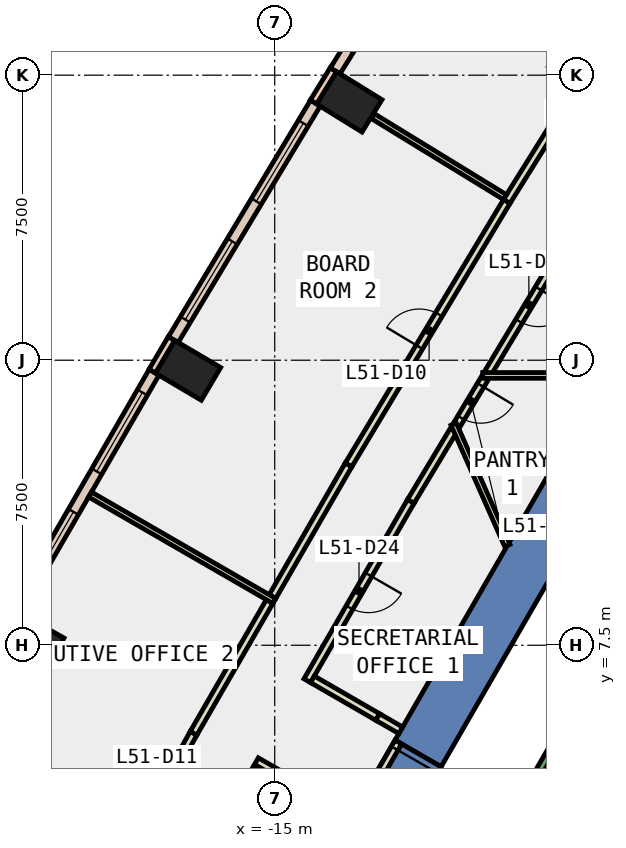
"""IFC4 building model, lengths in metres.
Left out: names, types, materials, properties, quantities, classifications, styles, units other than length and angle.
Written with IfcOpenShell. Run it as: python <this file> out.ifc"""

import sys

from ifc_helpers import new_model, si_unit, direction, frame, frame_2d, origin, origin_2d, place, context, subcontext, project, spatial, polyline, rectangle, outline, extrude, element, fill, save


model = new_model("IFC4")
c1 = context("Model", 3, precision=1e-05, world=origin(), true_north=direction((0.0, 1.0)))
c2 = subcontext(c1, "Body", "Model", "MODEL_VIEW")
j1 = project(units=[si_unit("LENGTHUNIT", "METRE"), si_unit("PLANEANGLEUNIT", "RADIAN")], contexts=[c1])
p1 = place(None, origin())
s1 = spatial("IfcSite", under=j1, at=p1, CompositionType="ELEMENT")
p2 = place(p1, origin())
s2 = spatial("IfcBuilding", under=s1, at=p2, CompositionType="ELEMENT")
p3 = place(p2, frame((0.0, 0.0, 227.6)))
s3 = spatial("IfcBuildingStorey", under=s2, at=p3, CompositionType="ELEMENT", Elevation=227.6)
for number, where, z_axis, x_axis in (
    (1, (-13.036, 21.797, -0.4), (0.0, 0.0, 1.0), (0.525, 0.851, 0.0)),
    (2, (-17.28, 14.733, -0.4), (0.0, 0.0, 1.0), (0.509, 0.861, 0.0)),
    (3, (-21.4, 7.599, -0.4), (0.0, 0.0, 1.0), (0.491, 0.871, 0.0)),
):
    element("IfcColumn", number, at=place(p3, frame(where, z_axis=z_axis, x_axis=x_axis)), inside=s3, PredefinedType="COLUMN", context=c2, shape_type="SweptSolid", body=[
        extrude(rectangle(XDim=1.0, YDim=1.4, at=origin_2d()), origin(), (0.0, 0.0, 1.0), 4.2),
    ])
p4 = place(p3, frame((0.0, 0.0, -0.4)))
e4 = element("IfcWall", 4, at=p4, inside=s3, PredefinedType="SHEAR", context=c2, shape_type="SweptSolid", body=[
    extrude(outline(polyline([(-11.834, 5.002), (-10.622, 4.302), (-5.831, 12.6), (-6.64, 14.0), (-11.834, 5.002)])), origin(), (0.0, 0.0, 1.0), 4.2),
])
p5 = place(p3, frame((0.0, 0.0, 3.6)))
e5 = element("IfcWall", 5, at=p5, inside=s3, PredefinedType="SHEAR", context=c2, shape_type="SweptSolid", body=[
    extrude(outline(polyline([(-12.834, 3.27), (-11.622, 2.57), (-10.622, 4.302), (-11.834, 5.002), (-12.834, 3.27)])), origin(), (0.0, 0.0, 1.0), 0.2),
])
p6 = place(p3, frame((-13.454, 22.643, 0.0), z_axis=(0.0, 0.0, 1.0), x_axis=(-0.525648735675, -0.850701714282, 0.0)))
e6 = element("IfcWall", 6, at=p6, inside=s3, PredefinedType="STANDARD", context=c2, shape_type="SweptSolid", body=[
    extrude(rectangle(XDim=1.0, YDim=0.2, at=frame_2d((0.5, 0.0))), origin(), (0.0, 0.0, 1.0), 3.8),
])
p7 = place(p3, frame((-17.715, 15.571, 0.0), z_axis=(0.0, 0.0, 1.0), x_axis=(-0.507980373775, -0.861368643416, 0.0)))
e7 = element("IfcWall", 7, at=p7, inside=s3, PredefinedType="STANDARD", context=c2, shape_type="SweptSolid", body=[
    extrude(rectangle(XDim=1.0, YDim=0.2, at=frame_2d((0.5, 0.0))), origin(), (0.0, 0.0, 1.0), 3.8),
])
p8 = place(p3, frame((-9.485, 28.893, 0.0), z_axis=(0.0, 0.0, 1.0), x_axis=(-0.530037467052, -0.847974223383, 0.0)))
e8 = element("IfcWall", 8, at=p8, inside=s3, PredefinedType="STANDARD", context=c2, shape_type="SweptSolid", body=[
    extrude(rectangle(XDim=7.405, YDim=0.3, at=frame_2d((3.702, 0.0))), origin(), (0.0, 0.0, 1.0), 3.8),
])
p9 = place(p8, frame((0.651, 0.0, 0.9)))
e9 = element("IfcOpeningElement", 9, at=p9, cuts=e8, PredefinedType="OPENING", context=c2, shape_type="SweptSolid", body=[
    extrude(rectangle(XDim=2.4, YDim=2.6, at=frame_2d((1.2, 1.3))), frame((0.0, 0.16, 0.0), z_axis=(0.0, -1.0, 0.0), x_axis=(1.0, 0.0, 0.0)), (0.0, 0.0, 1.0), 0.32),
])
p10 = place(p8, frame((4.354, 0.0, 0.9)))
e10 = element("IfcOpeningElement", 10, at=p10, cuts=e8, PredefinedType="OPENING", context=c2, shape_type="SweptSolid", body=[
    extrude(rectangle(XDim=2.4, YDim=2.6, at=frame_2d((1.2, 1.3))), frame((0.0, 0.16, 0.0), z_axis=(0.0, -1.0, 0.0), x_axis=(1.0, 0.0, 0.0)), (0.0, 0.0, 1.0), 0.32),
])
p11 = place(p3, frame((-13.931, 21.763, 0.0), z_axis=(0.0, 0.0, 1.0), x_axis=(-0.515049705348, -0.857160312323, 0.0)))
e11 = element("IfcWall", 11, at=p11, inside=s3, PredefinedType="STANDARD", context=c2, shape_type="SweptSolid", body=[
    extrude(rectangle(XDim=7.258, YDim=0.3, at=frame_2d((3.629, 0.0))), origin(), (0.0, 0.0, 1.0), 3.8),
])
p12 = place(p11, frame((0.614, 0.0, 0.9)))
e12 = element("IfcOpeningElement", 12, at=p12, cuts=e11, PredefinedType="OPENING", context=c2, shape_type="SweptSolid", body=[
    extrude(rectangle(XDim=2.4, YDim=2.6, at=frame_2d((1.2, 1.3))), frame((0.0, 0.16, 0.0), z_axis=(0.0, -1.0, 0.0), x_axis=(1.0, 0.0, 0.0)), (0.0, 0.0, 1.0), 0.32),
])
p13 = place(p11, frame((4.243, 0.0, 0.9)))
e13 = element("IfcOpeningElement", 13, at=p13, cuts=e11, PredefinedType="OPENING", context=c2, shape_type="SweptSolid", body=[
    extrude(rectangle(XDim=2.4, YDim=2.6, at=frame_2d((1.2, 1.3))), frame((0.0, 0.16, 0.0), z_axis=(0.0, -1.0, 0.0), x_axis=(1.0, 0.0, 0.0)), (0.0, 0.0, 1.0), 0.32),
])
p14 = place(p3, frame((-18.175, 14.683, 0.0), z_axis=(0.0, 0.0, 1.0), x_axis=(-0.500075798504, -0.865981637075, 0.0)))
e14 = element("IfcWall", 14, at=p14, inside=s3, PredefinedType="STANDARD", context=c2, shape_type="SweptSolid", body=[
    extrude(rectangle(XDim=7.257, YDim=0.3, at=frame_2d((3.628, 0.0))), origin(), (0.0, 0.0, 1.0), 3.8),
])
p15 = place(p14, frame((0.614, 0.0, 0.9)))
e15 = element("IfcOpeningElement", 15, at=p15, cuts=e14, PredefinedType="OPENING", context=c2, shape_type="SweptSolid", body=[
    extrude(rectangle(XDim=2.4, YDim=2.6, at=frame_2d((1.2, 1.3))), frame((0.0, 0.16, 0.0), z_axis=(0.0, -1.0, 0.0), x_axis=(1.0, 0.0, 0.0)), (0.0, 0.0, 1.0), 0.32),
])
p16 = place(p14, frame((4.242, 0.0, 0.9)))
e16 = element("IfcOpeningElement", 16, at=p16, cuts=e14, PredefinedType="OPENING", context=c2, shape_type="SweptSolid", body=[
    extrude(rectangle(XDim=2.4, YDim=2.6, at=frame_2d((1.2, 1.3))), frame((0.0, 0.16, 0.0), z_axis=(0.0, -1.0, 0.0), x_axis=(1.0, 0.0, 0.0)), (0.0, 0.0, 1.0), 0.32),
])
p17 = place(p3, frame((-9.466, 14.536, 0.0), z_axis=(0.0, 0.0, 1.0), x_axis=(-0.514545292, -0.857463201823, 0.0)))
e17 = element("IfcWall", 17, at=p17, inside=s3, PredefinedType="PARTITIONING", context=c2, shape_type="SweptSolid", body=[
    extrude(rectangle(XDim=1.449, YDim=0.2, at=frame_2d((0.725, 0.0))), origin(), (0.0, 0.0, 1.0), 3.8),
])
p18 = place(p17, frame((0.225, 0.0, 0.0)))
e18 = element("IfcOpeningElement", 18, at=p18, cuts=e17, PredefinedType="OPENING", context=c2, shape_type="SweptSolid", body=[
    extrude(rectangle(XDim=1.0, YDim=2.1, at=frame_2d((0.5, 1.05))), frame((0.0, 0.11, 0.0), z_axis=(0.0, -1.0, 0.0), x_axis=(1.0, 0.0, 0.0)), (0.0, 0.0, 1.0), 0.22),
])
p19 = place(p3, frame((-10.29, 13.164, 0.0), z_axis=(0.0, 0.0, 1.0), x_axis=(-0.514904735811, -0.857247404802, 0.0)))
e19 = element("IfcWall", 19, at=p19, inside=s3, PredefinedType="PARTITIONING", context=c2, shape_type="SweptSolid", body=[
    extrude(rectangle(XDim=2.194, YDim=0.2, at=frame_2d((1.097, 0.0))), origin(), (0.0, 0.0, 1.0), 3.8),
])
p20 = place(p3, frame((-11.42, 11.283, 0.0), z_axis=(0.0, 0.0, 1.0), x_axis=(-0.500179011873, -0.86592202656, 0.0)))
e20 = element("IfcWall", 20, at=p20, inside=s3, PredefinedType="PARTITIONING", context=c2, shape_type="SweptSolid", body=[
    extrude(rectangle(XDim=5.446, YDim=0.2, at=frame_2d((2.723, 0.0))), origin(), (0.0, 0.0, 1.0), 3.8),
])
p21 = place(p20, frame((2.223, 0.0, 0.0)))
e21 = element("IfcOpeningElement", 21, at=p21, cuts=e20, PredefinedType="OPENING", context=c2, shape_type="SweptSolid", body=[
    extrude(rectangle(XDim=1.0, YDim=2.1, at=frame_2d((0.5, 1.05))), frame((0.0, 0.11, 0.0), z_axis=(0.0, -1.0, 0.0), x_axis=(1.0, 0.0, 0.0)), (0.0, 0.0, 1.0), 0.22),
])
p22 = place(p3, frame((-14.007, 6.603, 0.0), z_axis=(0.0, 0.0, 1.0), x_axis=(0.866105617073, -0.499861040765, 0.0)))
e22 = element("IfcWall", 22, at=p22, inside=s3, PredefinedType="PARTITIONING", context=c2, shape_type="SweptSolid", body=[
    extrude(rectangle(XDim=1.982, YDim=0.2, at=frame_2d((0.991, 0.0))), origin(), (0.0, 0.0, 1.0), 3.8),
])
p23 = place(p3, frame((-7.237, 18.246, 0.0), z_axis=(0.0, 0.0, 1.0), x_axis=(-0.514959644878, -0.857214421336, 0.0)))
e23 = element("IfcWall", 23, at=p23, inside=s3, PredefinedType="PARTITIONING", context=c2, shape_type="SweptSolid", body=[
    extrude(rectangle(XDim=4.179, YDim=0.2, at=frame_2d((2.089, 0.0))), origin(), (0.0, 0.0, 1.0), 3.8),
])
p24 = place(p23, frame((1.589, 0.0, 0.0)))
e24 = element("IfcOpeningElement", 24, at=p24, cuts=e23, PredefinedType="OPENING", context=c2, shape_type="SweptSolid", body=[
    extrude(rectangle(XDim=1.0, YDim=2.1, at=frame_2d((0.5, 1.05))), frame((0.0, 0.11, 0.0), z_axis=(0.0, -1.0, 0.0), x_axis=(1.0, 0.0, 0.0)), (0.0, 0.0, 1.0), 0.22),
])
p25 = place(p3, frame((-15.482, 4.249, 0.0), z_axis=(0.0, 0.0, 1.0), x_axis=(-0.484683114876, -0.874689818252, 0.0)))
e25 = element("IfcWall", 25, at=p25, inside=s3, PredefinedType="PARTITIONING", context=c2, shape_type="SweptSolid", body=[
    extrude(rectangle(XDim=8.123, YDim=0.2, at=frame_2d((4.062, 0.0))), origin(), (0.0, 0.0, 1.0), 3.8),
])
p26 = place(p25, frame((3.561, 0.0, 0.0)))
e26 = element("IfcOpeningElement", 26, at=p26, cuts=e25, PredefinedType="OPENING", context=c2, shape_type="SweptSolid", body=[
    extrude(rectangle(XDim=1.0, YDim=2.1, at=frame_2d((0.5, 1.05))), frame((0.0, 0.11, 0.0), z_axis=(0.0, -1.0, 0.0), x_axis=(1.0, 0.0, 0.0)), (0.0, 0.0, 1.0), 0.22),
])
p27 = place(p3, frame((-8.896, 19.176, 0.0), z_axis=(0.0, 0.0, 1.0), x_axis=(0.529985425286, 0.848006750553, 0.0)))
e27 = element("IfcWall", 27, at=p27, inside=s3, PredefinedType="PARTITIONING", context=c2, shape_type="SweptSolid", body=[
    extrude(rectangle(XDim=8.119, YDim=0.2, at=frame_2d((4.06, 0.0))), origin(), (0.0, 0.0, 1.0), 3.8),
])
p28 = place(p27, frame((3.56, 0.0, 0.0)))
e28 = element("IfcOpeningElement", 28, at=p28, cuts=e27, PredefinedType="OPENING", context=c2, shape_type="SweptSolid", body=[
    extrude(rectangle(XDim=1.0, YDim=2.1, at=frame_2d((0.5, 1.05))), frame((0.0, 0.11, 0.0), z_axis=(0.0, -1.0, 0.0), x_axis=(1.0, 0.0, 0.0)), (0.0, 0.0, 1.0), 0.22),
])
p29 = place(p3, frame((-15.059, 8.78, 0.0), z_axis=(0.0, 0.0, 1.0), x_axis=(0.500093699572, 0.865971299552, 0.0)))
e29 = element("IfcWall", 29, at=p29, inside=s3, PredefinedType="PARTITIONING", context=c2, shape_type="SweptSolid", body=[
    extrude(rectangle(XDim=4.004, YDim=0.2, at=frame_2d((2.002, 0.0))), origin(), (0.0, 0.0, 1.0), 3.8),
])
p30 = place(p3, frame((-13.057, 12.247, 0.0), z_axis=(0.0, 0.0, 1.0), x_axis=(0.51490435266, 0.857247634941, 0.0)))
e30 = element("IfcWall", 30, at=p30, inside=s3, PredefinedType="PARTITIONING", context=c2, shape_type="SweptSolid", body=[
    extrude(rectangle(XDim=8.083, YDim=0.2, at=frame_2d((4.042, 0.0))), origin(), (0.0, 0.0, 1.0), 3.8),
])
p31 = place(p30, frame((3.616, 0.0, 0.0)))
e31 = element("IfcOpeningElement", 31, at=p31, cuts=e30, PredefinedType="OPENING", context=c2, shape_type="SweptSolid", body=[
    extrude(rectangle(XDim=1.0, YDim=2.1, at=frame_2d((0.5, 1.05))), frame((0.0, 0.11, 0.0), z_axis=(0.0, -1.0, 0.0), x_axis=(1.0, 0.0, 0.0)), (0.0, 0.0, 1.0), 0.22),
])
p32 = place(p3, frame((-19.076, 1.684, 0.0), z_axis=(0.0, 0.0, 1.0), x_axis=(0.484679349661, 0.874691904623, 0.0)))
e32 = element("IfcWall", 32, at=p32, inside=s3, PredefinedType="PARTITIONING", context=c2, shape_type="SweptSolid", body=[
    extrude(rectangle(XDim=4.002, YDim=0.2, at=frame_2d((2.001, 0.0))), origin(), (0.0, 0.0, 1.0), 3.8),
])
p33 = place(p32, frame((1.501, 0.0, 0.0)))
e33 = element("IfcOpeningElement", 33, at=p33, cuts=e32, PredefinedType="OPENING", context=c2, shape_type="SweptSolid", body=[
    extrude(rectangle(XDim=1.0, YDim=2.1, at=frame_2d((0.5, 1.05))), frame((0.0, 0.11, 0.0), z_axis=(0.0, -1.0, 0.0), x_axis=(1.0, 0.0, 0.0)), (0.0, 0.0, 1.0), 0.22),
])
p34 = place(p3, frame((-17.136, 5.185, 0.0), z_axis=(0.0, 0.0, 1.0), x_axis=(0.500102734445, 0.865966081899, 0.0)))
e34 = element("IfcWall", 34, at=p34, inside=s3, PredefinedType="PARTITIONING", context=c2, shape_type="SweptSolid", body=[
    extrude(rectangle(XDim=4.001, YDim=0.2, at=frame_2d((2.0, 0.0))), origin(), (0.0, 0.0, 1.0), 3.8),
])
p35 = place(p3, frame((-8.879, 10.123, 0.0), z_axis=(0.0, 0.0, 1.0), x_axis=(-0.404271206787, 0.914639159102, 0.0)))
e35 = element("IfcWall", 35, at=p35, inside=s3, PredefinedType="PARTITIONING", context=c2, shape_type="SweptSolid", body=[
    extrude(rectangle(XDim=3.495, YDim=0.15, at=frame_2d((1.748, 0.0))), origin(), (0.0, 0.0, 1.0), 3.8),
])
p36 = place(p3, frame((-4.047, 14.6, 0.0), z_axis=(0.0, 0.0, 1.0), x_axis=(-1.0, 0.0, 0.0)))
e36 = element("IfcWall", 36, at=p36, inside=s3, PredefinedType="PARTITIONING", context=c2, shape_type="SweptSolid", body=[
    extrude(rectangle(XDim=5.48, YDim=0.15, at=frame_2d((2.74, 0.0))), origin(), (0.0, 0.0, 1.0), 3.8),
])
p37 = place(p3, frame((-8.942, 19.292, 0.0), z_axis=(0.0, 0.0, 1.0), x_axis=(-0.85273109234, 0.522350154739, 0.0)))
e37 = element("IfcWall", 37, at=p37, inside=s3, PredefinedType="PARTITIONING", context=c2, shape_type="SweptSolid", body=[
    extrude(rectangle(XDim=4.08, YDim=0.15, at=frame_2d((2.04, 0.0))), origin(), (0.0, 0.0, 1.0), 3.8),
])
p38 = place(p3, frame((-15.01, 8.665, 0.0), z_axis=(0.0, 0.0, 1.0), x_axis=(-0.865961984968, 0.500109828528, 0.0)))
e38 = element("IfcWall", 38, at=p38, inside=s3, PredefinedType="PARTITIONING", context=c2, shape_type="SweptSolid", body=[
    extrude(rectangle(XDim=5.601, YDim=0.15, at=frame_2d((2.8, 0.0))), origin(), (0.0, 0.0, 1.0), 3.8),
])
p39 = place(p3, frame((-19.025, 1.57, 0.0), z_axis=(0.0, 0.0, 1.0), x_axis=(-0.874714019242, 0.484639437666, 0.0)))
e39 = element("IfcWall", 39, at=p39, inside=s3, PredefinedType="PARTITIONING", context=c2, shape_type="SweptSolid", body=[
    extrude(rectangle(XDim=5.6, YDim=0.15, at=frame_2d((2.8, 0.0))), origin(), (0.0, 0.0, 1.0), 3.8),
])
p40 = place(p3, frame((-11.747, 4.952, 0.0), z_axis=(0.0, 0.0, 1.0), x_axis=(-0.50002537861, -0.866010750942, 0.0)))
e40 = element("IfcWall", 40, at=p40, inside=s3, PredefinedType="PARTITIONING", context=c2, shape_type="SweptSolid", body=[
    extrude(rectangle(XDim=2.0, YDim=0.2, at=frame_2d((1.0, 0.0))), origin(), (0.0, 0.0, 1.0), 2.4),
])
p41 = place(p40, frame((0.19, 0.0, 0.0)))
e41 = element("IfcOpeningElement", 41, at=p41, cuts=e40, PredefinedType="OPENING", context=c2, shape_type="SweptSolid", body=[
    extrude(rectangle(XDim=1.8, YDim=2.1, at=frame_2d((0.9, 1.05))), frame((0.0, 0.11, 0.0), z_axis=(0.0, -1.0, 0.0), x_axis=(1.0, 0.0, 0.0)), (0.0, 0.0, 1.0), 0.22),
])
p42 = place(p3, frame((-12.29, 5.612, 0.0), z_axis=(0.0, 0.0, 1.0), x_axis=(0.865871789474, -0.500265973451, 0.0)))
e42 = element("IfcWall", 42, at=p42, inside=s3, PredefinedType="PARTITIONING", context=c2, shape_type="SweptSolid", body=[
    extrude(rectangle(XDim=0.7, YDim=0.2, at=frame_2d((0.35, 0.0))), origin(), (0.0, 0.0, 1.0), 2.4),
])
p43 = place(p3, frame((-13.59, 3.36, 0.0), z_axis=(0.0, 0.0, 1.0), x_axis=(-0.866004963011, 0.500035402787, 0.0)))
e43 = element("IfcWall", 43, at=p43, inside=s3, PredefinedType="PARTITIONING", context=c2, shape_type="SweptSolid", body=[
    extrude(rectangle(XDim=2.183, YDim=0.2, at=frame_2d((1.092, 0.0))), origin(), (0.0, 0.0, 1.0), 3.8),
])
p44 = place(p3, frame((-5.03, 9.388, 0.0), z_axis=(0.0, 0.0, 1.0), x_axis=(-0.499978703459, -0.866037698999, 0.0)))
e44 = element("IfcWall", 44, at=p44, inside=s3, PredefinedType="STANDARD", context=c2, shape_type="SweptSolid", body=[
    extrude(rectangle(XDim=6.9, YDim=0.2, at=frame_2d((3.45, 0.0))), origin(), (0.0, 0.0, 1.0), 3.8),
])
p45 = place(p12, origin())
e45 = element("IfcWindow", 45, at=p45, inside=s3, PartitioningType="SINGLE_PANEL", PredefinedType="WINDOW", context=c2, shape_type="SweptSolid", body=[
    extrude(rectangle(XDim=2.4, YDim=2.6, at=frame_2d((1.2, 1.3))), frame((0.0, 0.03, 0.0), z_axis=(0.0, -1.0, 0.0), x_axis=(1.0, 0.0, 0.0)), (0.0, 0.0, 1.0), 0.06),
])
fill(e12, e45)
p46 = place(p13, origin())
e46 = element("IfcWindow", 46, at=p46, inside=s3, PartitioningType="SINGLE_PANEL", PredefinedType="WINDOW", context=c2, shape_type="SweptSolid", body=[
    extrude(rectangle(XDim=2.4, YDim=2.6, at=frame_2d((1.2, 1.3))), frame((0.0, 0.03, 0.0), z_axis=(0.0, -1.0, 0.0), x_axis=(1.0, 0.0, 0.0)), (0.0, 0.0, 1.0), 0.06),
])
fill(e13, e46)
p47 = place(p15, origin())
e47 = element("IfcWindow", 47, at=p47, inside=s3, PartitioningType="SINGLE_PANEL", PredefinedType="WINDOW", context=c2, shape_type="SweptSolid", body=[
    extrude(rectangle(XDim=2.4, YDim=2.6, at=frame_2d((1.2, 1.3))), frame((0.0, 0.03, 0.0), z_axis=(0.0, -1.0, 0.0), x_axis=(1.0, 0.0, 0.0)), (0.0, 0.0, 1.0), 0.06),
])
fill(e15, e47)
p48 = place(p16, origin())
e48 = element("IfcWindow", 48, at=p48, inside=s3, PartitioningType="SINGLE_PANEL", PredefinedType="WINDOW", context=c2, shape_type="SweptSolid", body=[
    extrude(rectangle(XDim=2.4, YDim=2.6, at=frame_2d((1.2, 1.3))), frame((0.0, 0.03, 0.0), z_axis=(0.0, -1.0, 0.0), x_axis=(1.0, 0.0, 0.0)), (0.0, 0.0, 1.0), 0.06),
])
fill(e16, e48)
p49 = place(p31, origin())
e49 = element("IfcDoor", 49, at=p49, inside=s3, OperationType="SINGLE_SWING_RIGHT", PredefinedType="DOOR", context=c2, shape_type="SweptSolid", body=[
    extrude(rectangle(XDim=1.0, YDim=2.1, at=frame_2d((0.5, 1.05))), frame((0.0, 0.025, 0.0), z_axis=(0.0, -1.0, 0.0), x_axis=(1.0, 0.0, 0.0)), (0.0, 0.0, 1.0), 0.05),
])
fill(e31, e49)
p50 = place(p24, origin())
e50 = element("IfcDoor", 50, at=p50, inside=s3, OperationType="SINGLE_SWING_LEFT", PredefinedType="DOOR", context=c2, shape_type="SweptSolid", body=[
    extrude(rectangle(XDim=1.0, YDim=2.1, at=frame_2d((0.5, 1.05))), frame((0.0, 0.025, 0.0), z_axis=(0.0, -1.0, 0.0), x_axis=(1.0, 0.0, 0.0)), (0.0, 0.0, 1.0), 0.05),
])
fill(e24, e50)
p51 = place(p21, origin())
e51 = element("IfcDoor", 51, at=p51, inside=s3, OperationType="SINGLE_SWING_LEFT", PredefinedType="DOOR", context=c2, shape_type="SweptSolid", body=[
    extrude(rectangle(XDim=1.0, YDim=2.1, at=frame_2d((0.5, 1.05))), frame((0.0, 0.025, 0.0), z_axis=(0.0, -1.0, 0.0), x_axis=(1.0, 0.0, 0.0)), (0.0, 0.0, 1.0), 0.05),
])
fill(e21, e51)
p52 = place(p18, origin())
e52 = element("IfcDoor", 52, at=p52, inside=s3, OperationType="SINGLE_SWING_RIGHT", PredefinedType="DOOR", context=c2, shape_type="SweptSolid", body=[
    extrude(rectangle(XDim=1.0, YDim=2.1, at=frame_2d((0.5, 1.05))), frame((0.0, 0.025, 0.0), z_axis=(0.0, -1.0, 0.0), x_axis=(1.0, 0.0, 0.0)), (0.0, 0.0, 1.0), 0.05),
])
fill(e18, e52)
p53 = place(p41, origin())
e53 = element("IfcDoor", 53, at=p53, inside=s3, OperationType="DOUBLE_DOOR_SINGLE_SWING", PredefinedType="DOOR", context=c2, shape_type="SweptSolid", body=[
    extrude(rectangle(XDim=1.8, YDim=2.1, at=frame_2d((0.9, 1.05))), frame((0.0, 0.025, 0.0), z_axis=(0.0, -1.0, 0.0), x_axis=(1.0, 0.0, 0.0)), (0.0, 0.0, 1.0), 0.05),
])
fill(e41, e53)
save(model, sys.argv[1])
